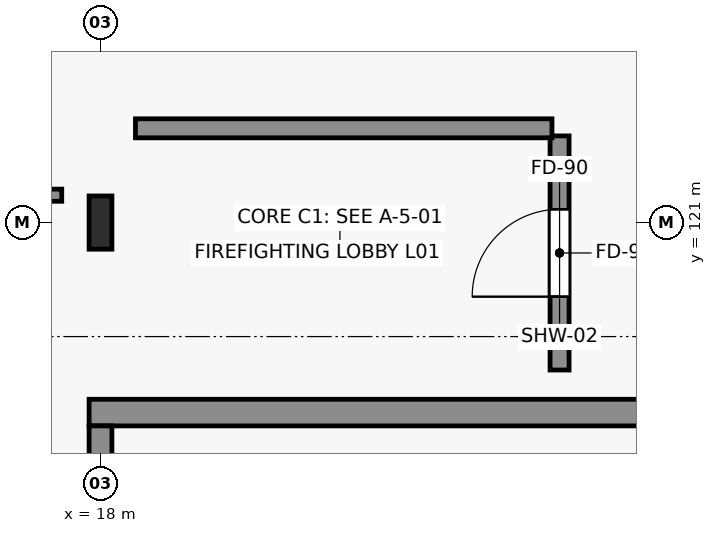
"""IFC4 building model, lengths in metres.
Left out: names, types, materials, properties, quantities, classifications, styles, units other than length and angle.
Written with IfcOpenShell. Run it as: python <this file> out.ifc"""

import sys

from ifc_helpers import new_model, si_unit, direction, frame, frame_2d, origin, origin_2d, place, context, subcontext, project, spatial, rectangle, i_section, extrude, element, fill, save


model = new_model("IFC4")
c1 = context("Model", 3, precision=1e-05, world=origin(), true_north=direction((0.0, 1.0)))
c2 = subcontext(c1, "Body", "Model", "MODEL_VIEW")
j1 = project(units=[si_unit("LENGTHUNIT", "METRE"), si_unit("PLANEANGLEUNIT", "RADIAN")], contexts=[c1])
p1 = place(None, origin())
s1 = spatial("IfcSite", under=j1, at=p1, CompositionType="ELEMENT")
p2 = place(p1, origin())
s2 = spatial("IfcBuilding", under=s1, at=p2, CompositionType="ELEMENT")
p3 = place(p2, frame((0.0, 0.0, 4.8)))
s3 = spatial("IfcBuildingStorey", under=s2, at=p3, CompositionType="ELEMENT", Elevation=4.8)
p4 = place(p3, frame((18.0, 121.0, 0.0), z_axis=(0.0, 0.0, 1.0), x_axis=(1.0, 0.0, 0.0)))
e1 = element("IfcColumn", 1, at=p4, inside=s3, PredefinedType="COLUMN", context=c2, shape_type="SweptSolid", body=[
    extrude(i_section(OverallWidth=0.3, OverallDepth=0.7, WebThickness=0.017, FlangeThickness=0.032, FilletRadius=0.027, at=origin_2d()), origin(), (0.0, 0.0, 1.0), 4.82),
])
p5 = place(p3, frame((17.85, 118.5, 0.0), z_axis=(0.0, 0.0, 1.0), x_axis=(1.0, 0.0, 0.0)))
e2 = element("IfcWall", 2, at=p5, inside=s3, PredefinedType="SHEAR", context=c2, shape_type="SweptSolid", body=[
    extrude(rectangle(XDim=9.3, YDim=0.35, at=frame_2d((4.65, 0.0))), origin(), (0.0, 0.0, 1.0), 4.82),
])
p6 = place(p3, frame((18.0, 113.5, 0.0), z_axis=(0.0, 0.0, 1.0), x_axis=(0.0, 1.0, 0.0)))
e3 = element("IfcWall", 3, at=p6, inside=s3, PredefinedType="SHEAR", context=c2, shape_type="SweptSolid", body=[
    extrude(rectangle(XDim=4.825, YDim=0.3, at=frame_2d((2.413, 0.0))), origin(), (0.0, 0.0, 1.0), 4.82),
])
p7 = place(p3, frame((17.49, 121.36, 0.0), z_axis=(0.0, 0.0, 1.0), x_axis=(-1.0, 0.0, 0.0)))
e4 = element("IfcWall", 4, at=p7, inside=s3, PredefinedType="PARTITIONING", context=c2, shape_type="SweptSolid", body=[
    extrude(rectangle(XDim=16.68, YDim=0.16, at=frame_2d((8.34, 0.0))), origin(), (0.0, 0.0, 1.0), 4.3),
])
p8 = place(p7, frame((5.572, 0.0, 0.0)))
e5 = element("IfcOpeningElement", 5, at=p8, cuts=e4, PredefinedType="OPENING", context=c2, shape_type="SweptSolid", body=[
    extrude(rectangle(XDim=0.95, YDim=2.15, at=frame_2d((0.475, 1.075))), frame((0.0, 0.09, 0.0), z_axis=(0.0, -1.0, 0.0), x_axis=(1.0, 0.0, 0.0)), (0.0, 0.0, 1.0), 0.18),
])
p9 = place(p3, frame((24.04, 119.06, 0.0), z_axis=(0.0, 0.0, 1.0), x_axis=(0.0, 1.0, 0.0)))
e6 = element("IfcWall", 6, at=p9, inside=s3, PredefinedType="SOLIDWALL", context=c2, shape_type="SweptSolid", body=[
    extrude(rectangle(XDim=3.08, YDim=0.25, at=frame_2d((1.54, 0.0))), origin(), (0.0, 0.0, 1.0), 4.3),
])
p10 = place(p9, frame((0.965, 0.0, 0.0)))
e7 = element("IfcOpeningElement", 7, at=p10, cuts=e6, PredefinedType="OPENING", context=c2, shape_type="SweptSolid", body=[
    extrude(rectangle(XDim=1.15, YDim=2.2, at=frame_2d((0.575, 1.1))), frame((0.0, 0.135, 0.0), z_axis=(0.0, -1.0, 0.0), x_axis=(1.0, 0.0, 0.0)), (0.0, 0.0, 1.0), 0.27),
])
p11 = place(p3, frame((18.46, 122.24, 0.0), z_axis=(0.0, 0.0, 1.0), x_axis=(1.0, 0.0, 0.0)))
e8 = element("IfcWall", 8, at=p11, inside=s3, PredefinedType="SOLIDWALL", context=c2, shape_type="SweptSolid", body=[
    extrude(rectangle(XDim=5.48, YDim=0.25, at=frame_2d((2.74, 0.0))), origin(), (0.0, 0.0, 1.0), 4.55),
])
p12 = place(p10, origin())
e9 = element("IfcDoor", 9, at=p12, inside=s3, OperationType="SINGLE_SWING_LEFT", PredefinedType="DOOR", context=c2, shape_type="SweptSolid", body=[
    extrude(rectangle(XDim=1.15, YDim=2.2, at=frame_2d((0.575, 1.1))), frame((0.0, 0.025, 0.0), z_axis=(0.0, -1.0, 0.0), x_axis=(1.0, 0.0, 0.0)), (0.0, 0.0, 1.0), 0.05),
])
fill(e7, e9)
save(model, sys.argv[1])
